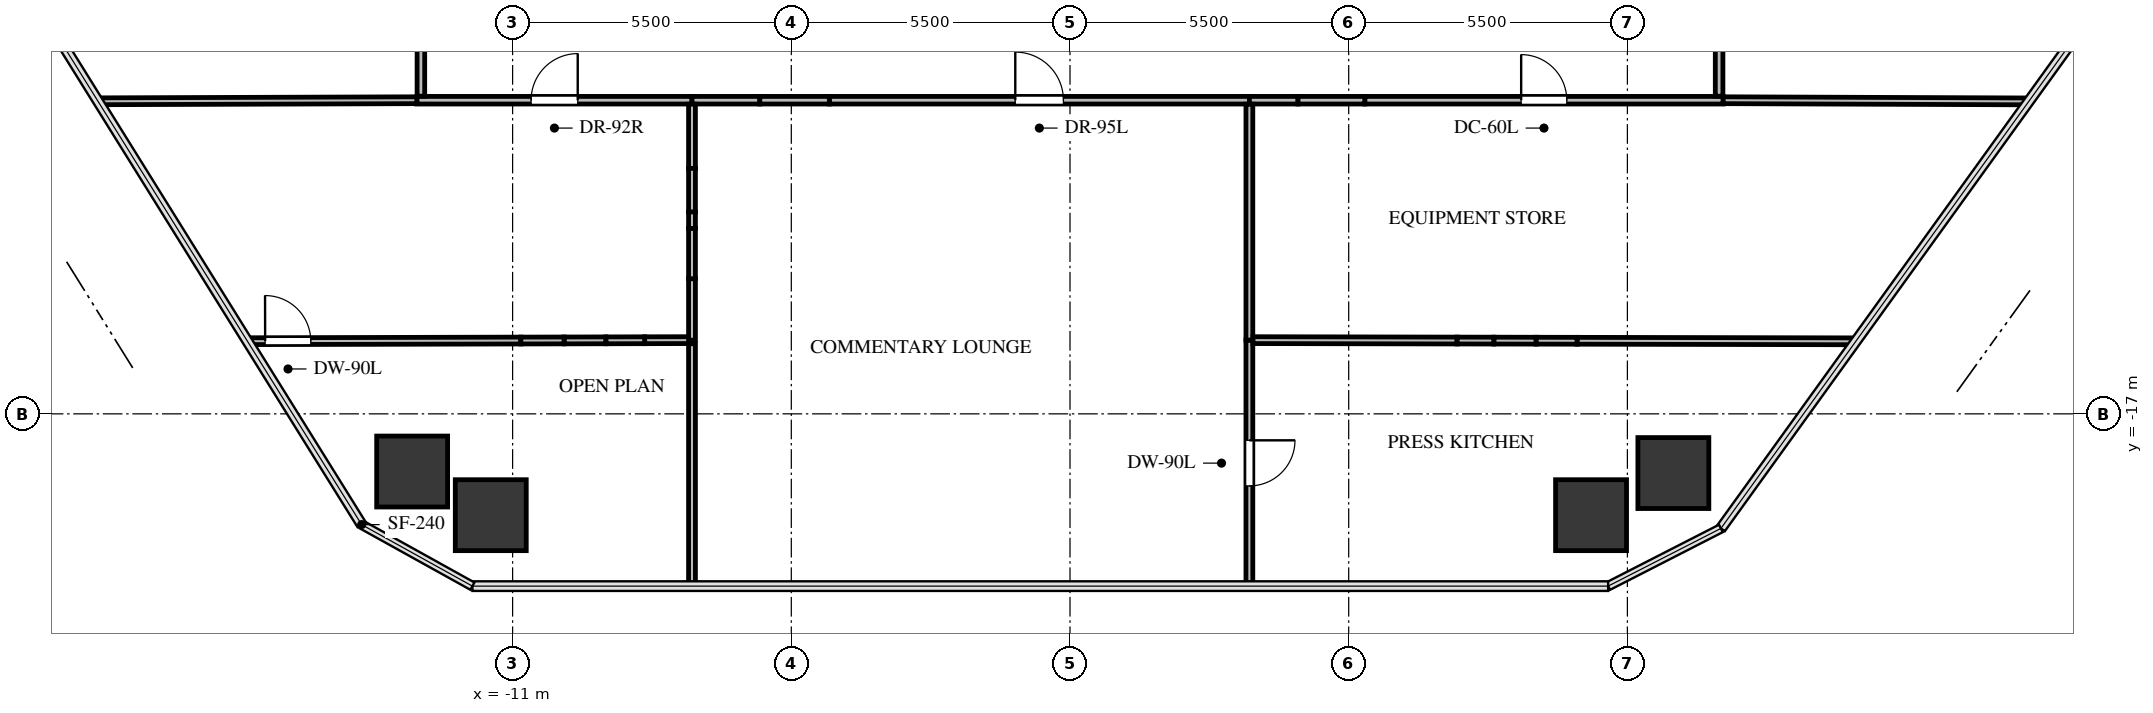
"""IFC4 building model, lengths in metres.
Left out: names, types, materials, properties, quantities, classifications, styles, units other than length and angle.
Written with IfcOpenShell. Run it as: python <this file> out.ifc"""

import sys

from ifc_helpers import new_model, si_unit, direction, frame, frame_2d, origin, origin_2d, place, context, subcontext, project, spatial, rectangle, extrude, source, transform, mapped, element, fill, save


model = new_model("IFC4")
c1 = context("Model", 3, precision=1e-05, world=origin(), true_north=direction((0.0, 1.0)))
c2 = subcontext(c1, "Body", "Model", "MODEL_VIEW")
j1 = project(units=[si_unit("LENGTHUNIT", "METRE"), si_unit("PLANEANGLEUNIT", "RADIAN")], contexts=[c1])
p1 = place(None, origin())
s1 = spatial("IfcSite", under=j1, at=p1, CompositionType="ELEMENT")
p2 = place(p1, origin())
s2 = spatial("IfcBuilding", under=s1, at=p2, CompositionType="ELEMENT")
p3 = place(p2, frame((0.0, 0.0, 52.2)))
s3 = spatial("IfcBuildingStorey", under=s2, at=p3, CompositionType="ELEMENT", Elevation=52.2)
m1 = source(origin(), c2, "Body", "SweptSolid", [
    extrude(rectangle(XDim=1.4, YDim=1.4, at=origin_2d()), origin(), (0.0, 0.0, 1.0), 3.3),
])
for number, where, z_axis, x_axis in (
    (1, (-12.983, -18.138, -0.24), (0.0, 0.0, 1.0), (1.0, 0.0, 0.0)),
    (2, (11.907, -18.168, -0.24), (0.0, 0.0, 1.0), (1.0, 0.0, 0.0)),
    (3, (10.283, -19.0, -0.24), (0.0, 0.0, 1.0), (1.0, 0.0, 0.0)),
    (4, (-11.431, -19.0, -0.24), (0.0, 0.0, 1.0), (1.0, 0.0, 0.0)),
):
    element("IfcColumn", number, at=place(p3, frame(where, z_axis=z_axis, x_axis=x_axis)), inside=s3, PredefinedType="COLUMN", context=c2, shape_type="MappedRepresentation", body=[
        mapped(m1, transform((0.0, 0.0, 0.0), x_axis=(1.0, 0.0, 0.0), y_axis=(0.0, 1.0, 0.0), z_axis=(0.0, 0.0, 1.0), scale=1.0)),
    ])
p4 = place(p3, frame((-12.89, -10.81, 0.0), z_axis=(0.0, 0.0, 1.0), x_axis=(1.0, 0.0, 0.0)))
e5 = element("IfcWall", 5, at=p4, inside=s3, PredefinedType="PARTITIONING", context=c2, shape_type="SweptSolid", body=[
    extrude(rectangle(XDim=5.43, YDim=0.15, at=frame_2d((2.715, 0.0))), origin(), (0.0, 0.0, 1.0), 3.045),
])
p5 = place(p4, frame((2.255, 0.0, 0.0)))
e6 = element("IfcOpeningElement", 6, at=p5, cuts=e5, PredefinedType="OPENING", context=c2, shape_type="SweptSolid", body=[
    extrude(rectangle(XDim=0.92, YDim=2.1, at=frame_2d((0.46, 1.05))), frame((0.0, 0.085, 0.0), z_axis=(0.0, -1.0, 0.0), x_axis=(1.0, 0.0, 0.0)), (0.0, 0.0, 1.0), 0.17),
])
p6 = place(p3, frame((-7.46, -10.81, 0.0), z_axis=(0.0, 0.0, 1.0), x_axis=(1.0, 0.0, 0.0)))
e7 = element("IfcWall", 7, at=p6, inside=s3, PredefinedType="PARTITIONING", context=c2, shape_type="SweptSolid", body=[
    extrude(rectangle(XDim=1.338, YDim=0.15, at=frame_2d((0.669, 0.0))), origin(), (0.0, 0.0, 1.0), 2.13),
])
p7 = place(p3, frame((-4.75, -10.81, 0.0), z_axis=(0.0, 0.0, 1.0), x_axis=(1.0, 0.0, 0.0)))
e8 = element("IfcWall", 8, at=p7, inside=s3, PredefinedType="PARTITIONING", context=c2, shape_type="SweptSolid", body=[
    extrude(rectangle(XDim=8.29, YDim=0.15, at=frame_2d((4.145, 0.0))), origin(), (0.0, 0.0, 1.0), 3.045),
])
p8 = place(p7, frame((3.67, 0.0, 0.0)))
e9 = element("IfcOpeningElement", 9, at=p8, cuts=e8, PredefinedType="OPENING", context=c2, shape_type="SweptSolid", body=[
    extrude(rectangle(XDim=0.95, YDim=2.1, at=frame_2d((0.475, 1.05))), frame((0.0, 0.085, 0.0), z_axis=(0.0, -1.0, 0.0), x_axis=(1.0, 0.0, 0.0)), (0.0, 0.0, 1.0), 0.17),
])
p9 = place(p3, frame((-6.122, -10.81, 0.0), z_axis=(0.0, 0.0, 1.0), x_axis=(1.0, 0.0, 0.0)))
e10 = element("IfcWall", 10, at=p9, inside=s3, PredefinedType="PARTITIONING", context=c2, shape_type="SweptSolid", body=[
    extrude(rectangle(XDim=1.372, YDim=0.15, at=frame_2d((0.686, 0.0))), origin(), (0.0, 0.0, 1.0), 2.13),
])
p10 = place(p3, frame((3.54, -10.81, 0.0), z_axis=(0.0, 0.0, 1.0), x_axis=(1.0, 0.0, 0.0)))
e11 = element("IfcWall", 11, at=p10, inside=s3, PredefinedType="PARTITIONING", context=c2, shape_type="SweptSolid", body=[
    extrude(rectangle(XDim=0.959, YDim=0.15, at=frame_2d((0.479, 0.0))), origin(), (0.0, 0.0, 1.0), 3.045),
])
p11 = place(p3, frame((5.817, -10.81, 0.0), z_axis=(0.0, 0.0, 1.0), x_axis=(1.0, 0.0, 0.0)))
e12 = element("IfcWall", 12, at=p11, inside=s3, PredefinedType="PARTITIONING", context=c2, shape_type="SweptSolid", body=[
    extrude(rectangle(XDim=7.073, YDim=0.15, at=frame_2d((3.536, 0.0))), origin(), (0.0, 0.0, 1.0), 2.13),
])
p12 = place(p11, frame((3.086, 0.0, 0.0)))
e13 = element("IfcOpeningElement", 13, at=p12, cuts=e12, PredefinedType="OPENING", context=c2, shape_type="SweptSolid", body=[
    extrude(rectangle(XDim=0.9, YDim=2.05, at=frame_2d((0.45, 1.025))), frame((0.0, 0.085, 0.0), z_axis=(0.0, -1.0, 0.0), x_axis=(1.0, 0.0, 0.0)), (0.0, 0.0, 1.0), 0.17),
])
p13 = place(p3, frame((4.499, -10.81, 0.0), z_axis=(0.0, 0.0, 1.0), x_axis=(1.0, 0.0, 0.0)))
e14 = element("IfcWall", 14, at=p13, inside=s3, PredefinedType="PARTITIONING", context=c2, shape_type="SweptSolid", body=[
    extrude(rectangle(XDim=1.318, YDim=0.15, at=frame_2d((0.659, 0.0))), origin(), (0.0, 0.0, 1.0), 2.13),
])
p14 = place(p3, frame((-12.81, 1.54, 0.0), z_axis=(0.0, 0.0, 1.0), x_axis=(0.0, -1.0, 0.0)))
e15 = element("IfcWall", 15, at=p14, inside=s3, PredefinedType="PARTITIONING", context=c2, shape_type="SweptSolid", body=[
    extrude(rectangle(XDim=12.271, YDim=0.15, at=frame_2d((6.135, 0.0))), origin(), (0.0, 0.0, 1.0), 3.045),
])
p15 = place(p14, frame((5.335, 0.0, 0.0)))
e16 = element("IfcOpeningElement", 16, at=p15, cuts=e15, PredefinedType="OPENING", context=c2, shape_type="SweptSolid", body=[
    extrude(rectangle(XDim=1.6, YDim=2.15, at=frame_2d((0.8, 1.075))), frame((0.0, 0.085, 0.0), z_axis=(0.0, -1.0, 0.0), x_axis=(1.0, 0.0, 0.0)), (0.0, 0.0, 1.0), 0.17),
])
p16 = place(p3, frame((12.81, -10.731, 0.0), z_axis=(0.0, 0.0, 1.0), x_axis=(0.0, 1.0, 0.0)))
e17 = element("IfcWall", 17, at=p16, inside=s3, PredefinedType="PARTITIONING", context=c2, shape_type="SweptSolid", body=[
    extrude(rectangle(XDim=2.291, YDim=0.15, at=frame_2d((1.146, 0.0))), origin(), (0.0, 0.0, 1.0), 3.045),
])
p17 = place(p3, frame((-16.234, -15.566, 0.0), z_axis=(0.0, 0.0, 1.0), x_axis=(0.999997015087, 0.002443321063, 0.0)))
e18 = element("IfcWall", 18, at=p17, inside=s3, PredefinedType="PARTITIONING", context=c2, shape_type="SweptSolid", body=[
    extrude(rectangle(XDim=5.396, YDim=0.135, at=frame_2d((2.698, 0.0))), origin(), (0.0, 0.0, 1.0), 2.13),
])
p18 = place(p17, frame((0.35, 0.0, 0.0)))
e19 = element("IfcOpeningElement", 19, at=p18, cuts=e18, PredefinedType="OPENING", context=c2, shape_type="SweptSolid", body=[
    extrude(rectangle(XDim=0.9, YDim=2.05, at=frame_2d((0.45, 1.025))), frame((0.0, 0.078, 0.0), z_axis=(0.0, -1.0, 0.0), x_axis=(1.0, 0.0, 0.0)), (0.0, 0.0, 1.0), 0.155),
])
p19 = place(p3, frame((-9.984, -15.551, 0.0), z_axis=(0.0, 0.0, 1.0), x_axis=(0.999997208907, 0.002362663222, 0.0)))
e20 = element("IfcWall", 20, at=p19, inside=s3, PredefinedType="PARTITIONING", context=c2, shape_type="SweptSolid", body=[
    extrude(rectangle(XDim=0.827, YDim=0.135, at=frame_2d((0.413, 0.0))), origin(), (0.0, 0.0, 1.0), 2.13),
])
p20 = place(p3, frame((-8.394, -15.547, 0.0), z_axis=(0.0, 0.0, 1.0), x_axis=(0.999997233292, 0.002352319681, 0.0)))
e21 = element("IfcWall", 21, at=p20, inside=s3, PredefinedType="PARTITIONING", context=c2, shape_type="SweptSolid", body=[
    extrude(rectangle(XDim=0.934, YDim=0.135, at=frame_2d((0.467, 0.0))), origin(), (0.0, 0.0, 1.0), 3.045),
])
p21 = place(p3, frame((-10.838, -15.553, 0.0), z_axis=(0.0, 0.0, 1.0), x_axis=(0.999997383281, 0.002287669164, 0.0)))
e22 = element("IfcWall", 22, at=p21, inside=s3, PredefinedType="PARTITIONING", context=c2, shape_type="SweptSolid", body=[
    extrude(rectangle(XDim=0.854, YDim=0.135, at=frame_2d((0.427, 0.0))), origin(), (0.0, 0.0, 1.0), 2.13),
])
p22 = place(p3, frame((-9.157, -15.549, 0.0), z_axis=(0.0, 0.0, 1.0), x_axis=(0.999996727406, 0.002558354275, 0.0)))
e23 = element("IfcWall", 23, at=p22, inside=s3, PredefinedType="PARTITIONING", context=c2, shape_type="SweptSolid", body=[
    extrude(rectangle(XDim=0.763, YDim=0.135, at=frame_2d((0.382, 0.0))), origin(), (0.0, 0.0, 1.0), 2.13),
])
p23 = place(p3, frame((-7.46, -15.616, 0.0), z_axis=(0.0, 0.0, 1.0), x_axis=(0.0, -1.0, 0.0)))
e24 = element("IfcWall", 24, at=p23, inside=s3, PredefinedType="PARTITIONING", context=c2, shape_type="SweptSolid", body=[
    extrude(rectangle(XDim=4.783, YDim=0.135, at=frame_2d((2.392, 0.0))), origin(), (0.0, 0.0, 1.0), 2.38),
])
p24 = place(p3, frame((-7.46, -10.889, 0.0), z_axis=(0.0, 0.0, 1.0), x_axis=(0.0, -1.0, 0.0)))
e25 = element("IfcWall", 25, at=p24, inside=s3, PredefinedType="PARTITIONING", context=c2, shape_type="SweptSolid", body=[
    extrude(rectangle(XDim=1.267, YDim=0.135, at=frame_2d((0.634, 0.0))), origin(), (0.0, 0.0, 1.0), 2.13),
])
p25 = place(p3, frame((-7.46, -13.013, 0.0), z_axis=(0.0, 0.0, 1.0), x_axis=(0.0, -1.0, 0.0)))
e26 = element("IfcWall", 26, at=p25, inside=s3, PredefinedType="PARTITIONING", context=c2, shape_type="SweptSolid", body=[
    extrude(rectangle(XDim=0.33, YDim=0.135, at=frame_2d((0.165, 0.0))), origin(), (0.0, 0.0, 1.0), 2.13),
])
p26 = place(p3, frame((-7.46, -14.333, 0.0), z_axis=(0.0, 0.0, 1.0), x_axis=(0.0, -1.0, 0.0)))
e27 = element("IfcWall", 27, at=p26, inside=s3, PredefinedType="PARTITIONING", context=c2, shape_type="SweptSolid", body=[
    extrude(rectangle(XDim=1.212, YDim=0.135, at=frame_2d((0.606, 0.0))), origin(), (0.0, 0.0, 1.0), 2.13),
])
p27 = place(p3, frame((-7.46, -12.156, 0.0), z_axis=(0.0, 0.0, 1.0), x_axis=(0.0, -1.0, 0.0)))
e28 = element("IfcWall", 28, at=p27, inside=s3, PredefinedType="PARTITIONING", context=c2, shape_type="SweptSolid", body=[
    extrude(rectangle(XDim=0.857, YDim=0.135, at=frame_2d((0.428, 0.0))), origin(), (0.0, 0.0, 1.0), 2.13),
])
p28 = place(p3, frame((-7.46, -13.342, 0.0), z_axis=(0.0, 0.0, 1.0), x_axis=(0.0, -1.0, 0.0)))
e29 = element("IfcWall", 29, at=p28, inside=s3, PredefinedType="PARTITIONING", context=c2, shape_type="SweptSolid", body=[
    extrude(rectangle(XDim=0.991, YDim=0.135, at=frame_2d((0.495, 0.0))), origin(), (0.0, 0.0, 1.0), 2.13),
])
p29 = place(p3, frame((-19.182, -10.831, 0.0), z_axis=(0.0, 0.0, 1.0), x_axis=(0.999994432845, 0.003336806783, 0.0)))
e30 = element("IfcWall", 30, at=p29, inside=s3, PredefinedType="PARTITIONING", context=c2, shape_type="SweptSolid", body=[
    extrude(rectangle(XDim=6.292, YDim=0.135, at=frame_2d((3.146, 0.0))), origin(), (0.0, 0.0, 1.0), 2.38),
])
p30 = place(p3, frame((3.54, -15.545, 0.0), z_axis=(0.0, 0.0, 1.0), x_axis=(0.0, -1.0, 0.0)))
e31 = element("IfcWall", 31, at=p30, inside=s3, PredefinedType="PARTITIONING", context=c2, shape_type="SweptSolid", body=[
    extrude(rectangle(XDim=4.855, YDim=0.135, at=frame_2d((2.427, 0.0))), origin(), (0.0, 0.0, 1.0), 2.38),
])
p31 = place(p30, frame((1.978, 0.0, 0.0)))
e32 = element("IfcOpeningElement", 32, at=p31, cuts=e31, PredefinedType="OPENING", context=c2, shape_type="SweptSolid", body=[
    extrude(rectangle(XDim=0.9, YDim=2.05, at=frame_2d((0.45, 1.025))), frame((0.0, 0.078, 0.0), z_axis=(0.0, -1.0, 0.0), x_axis=(1.0, 0.0, 0.0)), (0.0, 0.0, 1.0), 0.155),
])
p32 = place(p3, frame((3.54, -10.889, 0.0), z_axis=(0.0, 0.0, 1.0), x_axis=(0.0, -1.0, 0.0)))
e33 = element("IfcWall", 33, at=p32, inside=s3, PredefinedType="PARTITIONING", context=c2, shape_type="SweptSolid", body=[
    extrude(rectangle(XDim=4.656, YDim=0.135, at=frame_2d((2.328, 0.0))), origin(), (0.0, 0.0, 1.0), 3.045),
])
p33 = place(p3, frame((3.612, -15.545, 0.0), z_axis=(0.0, 0.0, 1.0), x_axis=(0.999998234227, -0.001879240135, 0.0)))
e34 = element("IfcWall", 34, at=p33, inside=s3, PredefinedType="PARTITIONING", context=c2, shape_type="SweptSolid", body=[
    extrude(rectangle(XDim=4.027, YDim=0.135, at=frame_2d((2.014, 0.0))), origin(), (0.0, 0.0, 1.0), 3.045),
])
p34 = place(p3, frame((8.364, -15.554, 0.0), z_axis=(0.0, 0.0, 1.0), x_axis=(0.999997907793, -0.002045583096, 0.0)))
e35 = element("IfcWall", 35, at=p34, inside=s3, PredefinedType="PARTITIONING", context=c2, shape_type="SweptSolid", body=[
    extrude(rectangle(XDim=0.835, YDim=0.135, at=frame_2d((0.418, 0.0))), origin(), (0.0, 0.0, 1.0), 3.045),
])
p35 = place(p3, frame((10.007, -15.558, 0.0), z_axis=(0.0, 0.0, 1.0), x_axis=(0.999998093672, -0.00195260123, 0.0)))
e36 = element("IfcWall", 36, at=p35, inside=s3, PredefinedType="PARTITIONING", context=c2, shape_type="SweptSolid", body=[
    extrude(rectangle(XDim=5.501, YDim=0.135, at=frame_2d((2.751, 0.0))), origin(), (0.0, 0.0, 1.0), 2.38),
])
p36 = place(p3, frame((7.639, -15.553, 0.0), z_axis=(0.0, 0.0, 1.0), x_axis=(0.999997960772, -0.002019517928, 0.0)))
e37 = element("IfcWall", 37, at=p36, inside=s3, PredefinedType="PARTITIONING", context=c2, shape_type="SweptSolid", body=[
    extrude(rectangle(XDim=0.725, YDim=0.135, at=frame_2d((0.363, 0.0))), origin(), (0.0, 0.0, 1.0), 2.13),
])
p37 = place(p3, frame((9.2, -15.556, 0.0), z_axis=(0.0, 0.0, 1.0), x_axis=(0.999998352109, -0.001815428173, 0.0)))
e38 = element("IfcWall", 38, at=p37, inside=s3, PredefinedType="PARTITIONING", context=c2, shape_type="SweptSolid", body=[
    extrude(rectangle(XDim=0.807, YDim=0.135, at=frame_2d((0.403, 0.0))), origin(), (0.0, 0.0, 1.0), 2.13),
])
p38 = place(p3, frame((12.89, -10.81, 0.0), z_axis=(0.0, 0.0, 1.0), x_axis=(0.999992607823, -0.003845035728, 0.0)))
e39 = element("IfcWall", 39, at=p38, inside=s3, PredefinedType="PARTITIONING", context=c2, shape_type="SweptSolid", body=[
    extrude(rectangle(XDim=6.032, YDim=0.135, at=frame_2d((3.016, 0.0))), origin(), (0.0, 0.0, 1.0), 2.38),
])
m2 = source(origin(), c2, "Body", "SweptSolid", [
    extrude(rectangle(XDim=0.92, YDim=2.1, at=frame_2d((0.46, 1.05))), frame((0.0, 0.025, 0.0), z_axis=(0.0, -1.0, 0.0), x_axis=(1.0, 0.0, 0.0)), (0.0, 0.0, 1.0), 0.05),
])
p39 = place(p5, origin())
e40 = element("IfcDoor", 40, at=p39, inside=s3, OperationType="SINGLE_SWING_RIGHT", PredefinedType="DOOR", context=c2, shape_type="MappedRepresentation", body=[
    mapped(m2, transform((0.0, 0.0, 0.0), x_axis=(1.0, 0.0, 0.0), y_axis=(0.0, 1.0, 0.0), z_axis=(0.0, 0.0, 1.0), scale=1.0)),
])
fill(e6, e40)
m3 = source(origin(), c2, "Body", "SweptSolid", [
    extrude(rectangle(XDim=0.95, YDim=2.1, at=frame_2d((0.475, 1.05))), frame((0.0, 0.025, 0.0), z_axis=(0.0, -1.0, 0.0), x_axis=(1.0, 0.0, 0.0)), (0.0, 0.0, 1.0), 0.05),
])
p40 = place(p8, origin())
e41 = element("IfcDoor", 41, at=p40, inside=s3, OperationType="SINGLE_SWING_LEFT", PredefinedType="DOOR", context=c2, shape_type="MappedRepresentation", body=[
    mapped(m3, transform((0.0, 0.0, 0.0), x_axis=(1.0, 0.0, 0.0), y_axis=(0.0, 1.0, 0.0), z_axis=(0.0, 0.0, 1.0), scale=1.0)),
])
fill(e9, e41)
m4 = source(origin(), c2, "Body", "SweptSolid", [
    extrude(rectangle(XDim=0.9, YDim=2.05, at=frame_2d((0.45, 1.025))), frame((0.0, 0.025, 0.0), z_axis=(0.0, -1.0, 0.0), x_axis=(1.0, 0.0, 0.0)), (0.0, 0.0, 1.0), 0.05),
])
p41 = place(p12, origin())
e42 = element("IfcDoor", 42, at=p41, inside=s3, OperationType="SINGLE_SWING_LEFT", PredefinedType="DOOR", context=c2, shape_type="MappedRepresentation", body=[
    mapped(m4, transform((0.0, 0.0, 0.0), x_axis=(1.0, 0.0, 0.0), y_axis=(0.0, 1.0, 0.0), z_axis=(0.0, 0.0, 1.0), scale=1.0)),
])
fill(e13, e42)
m5 = source(origin(), c2, "Body", "SweptSolid", [
    extrude(rectangle(XDim=0.9, YDim=2.05, at=frame_2d((0.45, 1.025))), frame((0.0, 0.025, 0.0), z_axis=(0.0, -1.0, 0.0), x_axis=(1.0, 0.0, 0.0)), (0.0, 0.0, 1.0), 0.05),
])
p42 = place(p18, origin())
e43 = element("IfcDoor", 43, at=p42, inside=s3, OperationType="SINGLE_SWING_LEFT", PredefinedType="DOOR", context=c2, shape_type="MappedRepresentation", body=[
    mapped(m5, transform((0.0, 0.0, 0.0), x_axis=(1.0, 0.0, 0.0), y_axis=(0.0, 1.0, 0.0), z_axis=(0.0, 0.0, 1.0), scale=1.0)),
])
fill(e19, e43)
p43 = place(p31, origin())
e44 = element("IfcDoor", 44, at=p43, inside=s3, OperationType="SINGLE_SWING_LEFT", PredefinedType="DOOR", context=c2, shape_type="MappedRepresentation", body=[
    mapped(m5, transform((0.0, 0.0, 0.0), x_axis=(1.0, 0.0, 0.0), y_axis=(0.0, 1.0, 0.0), z_axis=(0.0, 0.0, 1.0), scale=1.0)),
])
fill(e32, e44)
save(model, sys.argv[1])
